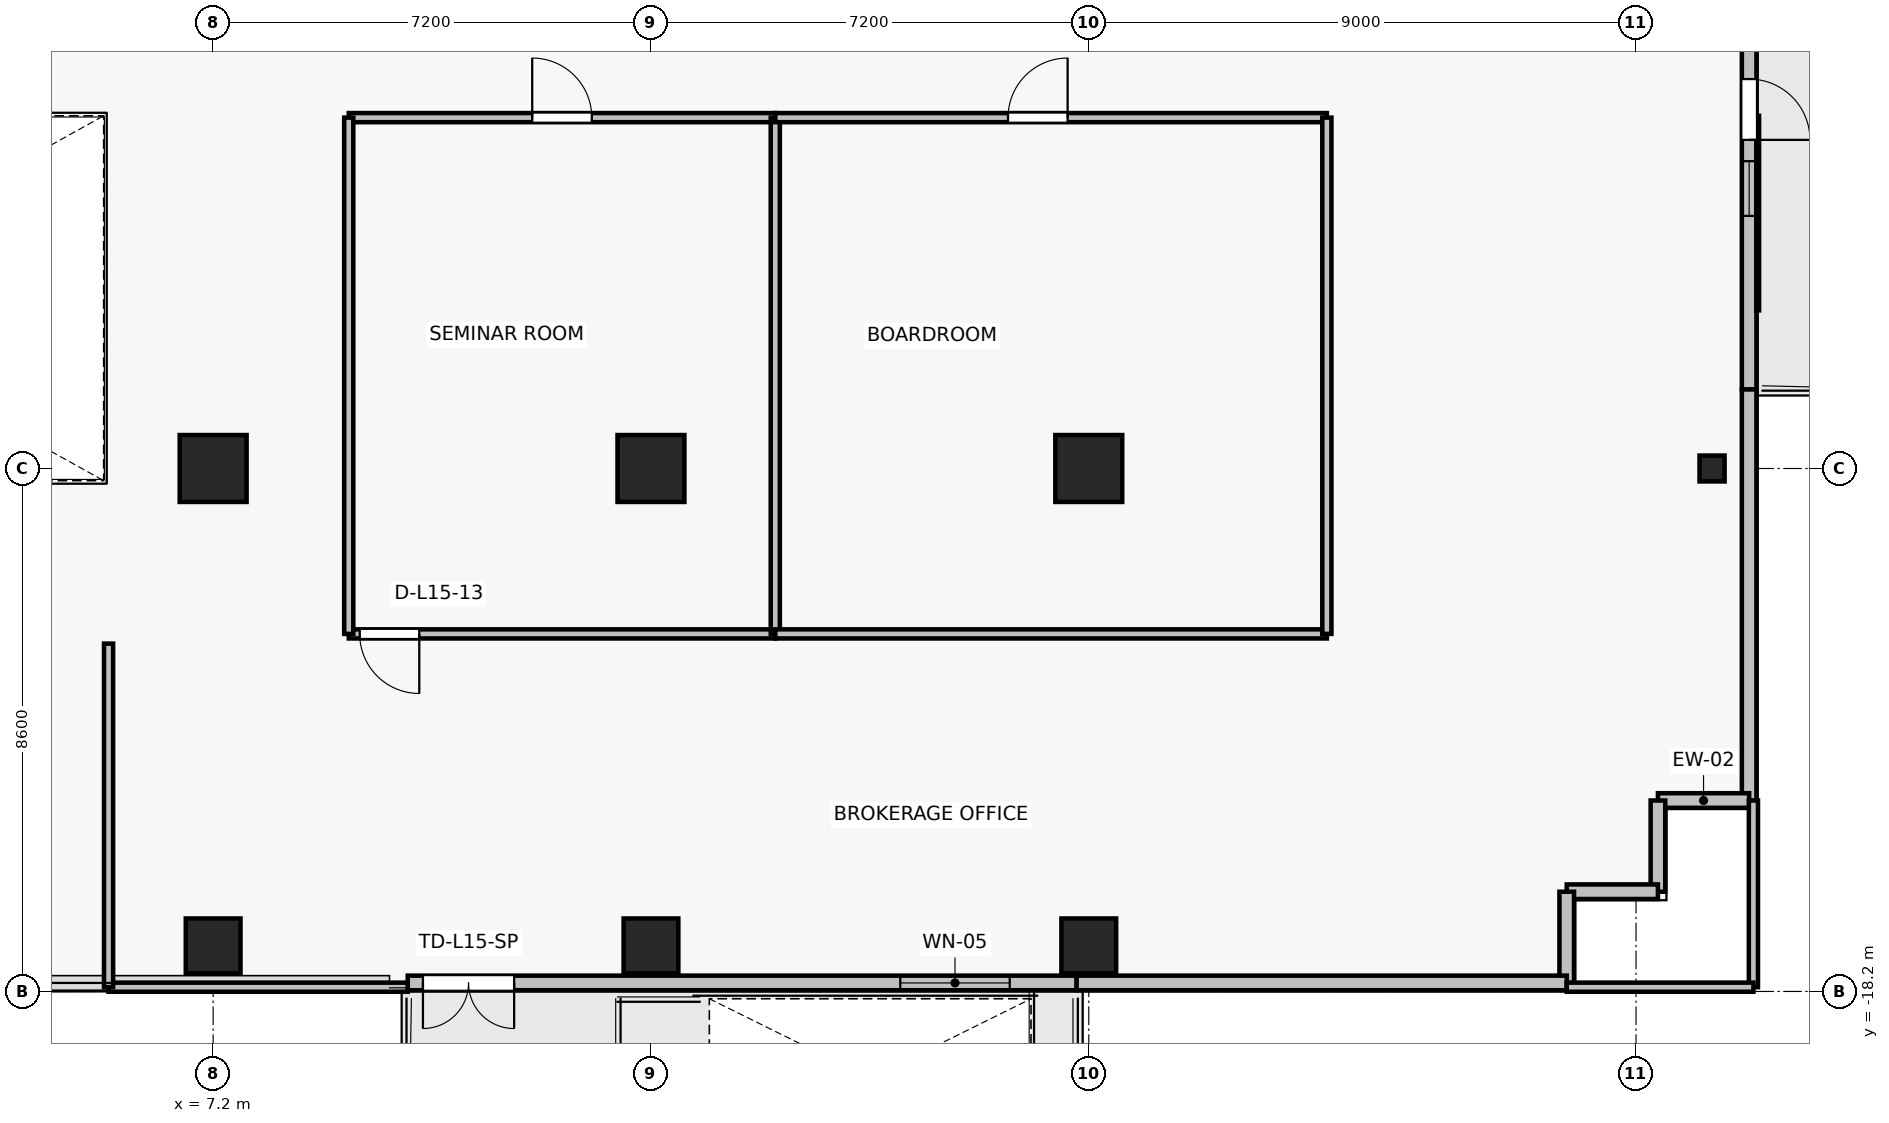
"""IFC4 building model, lengths in metres.
Left out: names, types, materials, properties, quantities, classifications, styles, units other than length and angle.
Written with IfcOpenShell. Run it as: python <this file> out.ifc"""

import sys

from ifc_helpers import new_model, si_unit, direction, frame, frame_2d, origin, origin_2d, place, context, subcontext, project, spatial, rectangle, i_section, extrude, source, transform, mapped, element, fill, save


model = new_model("IFC4")
c1 = context("Model", 3, precision=1e-05, world=origin(), true_north=direction((0.0, 1.0)))
c2 = subcontext(c1, "Body", "Model", "MODEL_VIEW")
j1 = project(units=[si_unit("LENGTHUNIT", "METRE"), si_unit("PLANEANGLEUNIT", "RADIAN")], contexts=[c1])
p1 = place(None, origin())
s1 = spatial("IfcSite", under=j1, at=p1, CompositionType="ELEMENT")
p2 = place(p1, origin())
s2 = spatial("IfcBuilding", under=s1, at=p2, CompositionType="ELEMENT")
p3 = place(p2, frame((0.0, 0.0, 57.1)))
s3 = spatial("IfcBuildingStorey", under=s2, at=p3, CompositionType="ELEMENT", Elevation=57.1)
for number, where, z_axis, x_axis in (
    (1, (7.2, -9.6, 0.0), (0.0, 0.0, 1.0), (1.0, 0.0, 0.0)),
    (2, (14.4, -9.6, 0.0), (0.0, 0.0, 1.0), (1.0, 0.0, 0.0)),
    (3, (21.6, -9.6, 0.0), (0.0, 0.0, 1.0), (1.0, 0.0, 0.0)),
):
    element("IfcColumn", number, at=place(p3, frame(where, z_axis=z_axis, x_axis=x_axis)), inside=s3, PredefinedType="COLUMN", context=c2, shape_type="SweptSolid", body=[
        extrude(rectangle(XDim=1.1, YDim=1.1, at=origin_2d()), origin(), (0.0, 0.0, 1.0), 3.3),
    ])
for number, where, z_axis, x_axis in (
    (4, (7.2, -17.45, 0.0), (0.0, 0.0, 1.0), (1.0, 0.0, 0.0)),
    (5, (14.4, -17.45, 0.0), (0.0, 0.0, 1.0), (1.0, 0.0, 0.0)),
    (6, (21.6, -17.45, 0.0), (0.0, 0.0, 1.0), (1.0, 0.0, 0.0)),
):
    element("IfcColumn", number, at=place(p3, frame(where, z_axis=z_axis, x_axis=x_axis)), inside=s3, PredefinedType="COLUMN", context=c2, shape_type="SweptSolid", body=[
        extrude(rectangle(XDim=0.9, YDim=0.9, at=origin_2d()), origin(), (0.0, 0.0, 1.0), 3.3),
    ])
p4 = place(p3, frame((31.85, -9.6, 0.0), z_axis=(0.0, 0.0, 1.0), x_axis=(1.0, 0.0, 0.0)))
e7 = element("IfcColumn", 7, at=p4, inside=s3, PredefinedType="COLUMN", context=c2, shape_type="SweptSolid", body=[
    extrude(i_section(OverallWidth=0.412, OverallDepth=0.425, WebThickness=0.026, FlangeThickness=0.039, FilletRadius=0.015, at=origin_2d()), origin(), (0.0, 0.0, 1.0), 3.3),
])
p5 = place(p3, frame((32.46, -2.5, 0.0), z_axis=(0.0, 0.0, 1.0), x_axis=(0.0, -1.0, 0.0)))
e8 = element("IfcWall", 8, at=p5, inside=s3, PredefinedType="SOLIDWALL", context=c2, shape_type="SweptSolid", body=[
    extrude(rectangle(XDim=5.8, YDim=0.24, at=frame_2d((2.9, 0.0))), origin(), (0.0, 0.0, 1.0), 3.075),
])
p6 = place(p5, frame((0.696, 0.0, 0.0)))
e9 = element("IfcOpeningElement", 9, at=p6, cuts=e8, PredefinedType="OPENING", context=c2, shape_type="SweptSolid", body=[
    extrude(rectangle(XDim=1.0, YDim=2.2, at=frame_2d((0.5, 1.1))), frame((0.0, 0.13, 0.0), z_axis=(0.0, -1.0, 0.0), x_axis=(1.0, 0.0, 0.0)), (0.0, 0.0, 1.0), 0.26),
])
p7 = place(p5, frame((2.046, 0.0, 0.85)))
e10 = element("IfcOpeningElement", 10, at=p7, cuts=e8, PredefinedType="OPENING", context=c2, shape_type="SweptSolid", body=[
    extrude(rectangle(XDim=0.9, YDim=1.35, at=frame_2d((0.45, 0.675))), frame((0.0, 0.13, 0.0), z_axis=(0.0, -1.0, 0.0), x_axis=(1.0, 0.0, 0.0)), (0.0, 0.0, 1.0), 0.26),
])
p8 = place(p3, frame((21.4, -18.06, 0.0), z_axis=(0.0, 0.0, 1.0), x_axis=(-1.0, 0.0, 0.0)))
e11 = element("IfcWall", 11, at=p8, inside=s3, PredefinedType="SOLIDWALL", context=c2, shape_type="SweptSolid", body=[
    extrude(rectangle(XDim=11.0, YDim=0.24, at=frame_2d((5.5, 0.0))), origin(), (0.0, 0.0, 1.0), 2.665),
])
p9 = place(p8, frame((9.25, 0.0, 0.0)))
e12 = element("IfcOpeningElement", 12, at=p9, cuts=e11, PredefinedType="OPENING", context=c2, shape_type="SweptSolid", body=[
    extrude(rectangle(XDim=1.5, YDim=2.2, at=frame_2d((0.75, 1.1))), frame((0.0, 0.13, 0.0), z_axis=(0.0, -1.0, 0.0), x_axis=(1.0, 0.0, 0.0)), (0.0, 0.0, 1.0), 0.26),
])
p10 = place(p8, frame((1.1, 0.0, 0.85)))
e13 = element("IfcOpeningElement", 13, at=p10, cuts=e11, PredefinedType="OPENING", context=c2, shape_type="SweptSolid", body=[
    extrude(rectangle(XDim=1.8, YDim=1.6, at=frame_2d((0.9, 0.8))), frame((0.0, 0.13, 0.0), z_axis=(0.0, -1.0, 0.0), x_axis=(1.0, 0.0, 0.0)), (0.0, 0.0, 1.0), 0.26),
])
p11 = place(p3, frame((32.46, -15.06, 0.0), z_axis=(0.0, 0.0, 1.0), x_axis=(0.0, 1.0, 0.0)))
e14 = element("IfcWall", 14, at=p11, inside=s3, PredefinedType="SOLIDWALL", context=c2, shape_type="SweptSolid", body=[
    extrude(rectangle(XDim=6.76, YDim=0.24, at=frame_2d((3.38, 0.0))), origin(), (0.0, 0.0, 1.0), 3.075),
])
for number, where, z_axis, x_axis in (
    (15, (30.96, -15.06, 0.0), (0.0, 0.0, 1.0), (1.0, 0.0, 0.0)),
    (16, (30.96, -16.56, 0.0), (0.0, 0.0, 1.0), (0.0, 1.0, 0.0)),
    (17, (29.46, -16.56, 0.0), (0.0, 0.0, 1.0), (1.0, 0.0, 0.0)),
    (18, (29.46, -18.06, 0.0), (0.0, 0.0, 1.0), (0.0, 1.0, 0.0)),
):
    element("IfcWall", number, at=place(p3, frame(where, z_axis=z_axis, x_axis=x_axis)), inside=s3, PredefinedType="SOLIDWALL", context=c2, shape_type="SweptSolid", body=[
        extrude(rectangle(XDim=1.5, YDim=0.24, at=frame_2d((0.75, 0.0))), origin(), (0.0, 0.0, 1.0), 3.075),
    ])
p12 = place(p3, frame((21.4, -18.06, 0.0), z_axis=(0.0, 0.0, 1.0), x_axis=(1.0, 0.0, 0.0)))
e19 = element("IfcWall", 19, at=p12, inside=s3, PredefinedType="SOLIDWALL", context=c2, shape_type="SweptSolid", body=[
    extrude(rectangle(XDim=8.06, YDim=0.24, at=frame_2d((4.03, 0.0))), origin(), (0.0, 0.0, 1.0), 3.075),
])
p13 = place(p3, frame((16.445, -12.32, 0.0), z_axis=(0.0, 0.0, 1.0), x_axis=(-1.0, 0.0, 0.0)))
e20 = element("IfcWall", 20, at=p13, inside=s3, PredefinedType="PARTITIONING", context=c2, shape_type="SweptSolid", body=[
    extrude(rectangle(XDim=7.015, YDim=0.15, at=frame_2d((3.507, 0.0))), origin(), (0.0, 0.0, 1.0), 2.465),
])
p14 = place(p13, frame((5.854, 0.0, 0.0)))
e21 = element("IfcOpeningElement", 21, at=p14, cuts=e20, PredefinedType="OPENING", context=c2, shape_type="SweptSolid", body=[
    extrude(rectangle(XDim=0.98, YDim=2.15, at=frame_2d((0.49, 1.075))), frame((0.0, 0.085, 0.0), z_axis=(0.0, -1.0, 0.0), x_axis=(1.0, 0.0, 0.0)), (0.0, 0.0, 1.0), 0.17),
])
p15 = place(p3, frame((9.43, -3.83, 0.0), z_axis=(0.0, 0.0, 1.0), x_axis=(1.0, 0.0, 0.0)))
e22 = element("IfcWall", 22, at=p15, inside=s3, PredefinedType="PARTITIONING", context=c2, shape_type="SweptSolid", body=[
    extrude(rectangle(XDim=7.015, YDim=0.15, at=frame_2d((3.507, 0.0))), origin(), (0.0, 0.0, 1.0), 2.465),
])
p16 = place(p15, frame((3.017, 0.0, 0.0)))
e23 = element("IfcOpeningElement", 23, at=p16, cuts=e22, PredefinedType="OPENING", context=c2, shape_type="SweptSolid", body=[
    extrude(rectangle(XDim=0.98, YDim=2.15, at=frame_2d((0.49, 1.075))), frame((0.0, 0.085, 0.0), z_axis=(0.0, -1.0, 0.0), x_axis=(1.0, 0.0, 0.0)), (0.0, 0.0, 1.0), 0.17),
])
for number, where, z_axis, x_axis in (
    (24, (9.43, -12.32, 0.0), (0.0, 0.0, 1.0), (0.0, 1.0, 0.0)),
    (25, (16.445, -3.83, 0.0), (0.0, 0.0, 1.0), (0.0, -1.0, 0.0)),
):
    element("IfcWall", number, at=place(p3, frame(where, z_axis=z_axis, x_axis=x_axis)), inside=s3, PredefinedType="PARTITIONING", context=c2, shape_type="SweptSolid", body=[
        extrude(rectangle(XDim=8.49, YDim=0.15, at=frame_2d((4.245, 0.0))), origin(), (0.0, 0.0, 1.0), 2.465),
    ])
p17 = place(p3, frame((25.515, -12.32, 0.0), z_axis=(0.0, 0.0, 1.0), x_axis=(-1.0, 0.0, 0.0)))
e26 = element("IfcWall", 26, at=p17, inside=s3, PredefinedType="PARTITIONING", context=c2, shape_type="SweptSolid", body=[
    extrude(rectangle(XDim=9.071, YDim=0.15, at=frame_2d((4.535, 0.0))), origin(), (0.0, 0.0, 1.0), 2.465),
])
p18 = place(p3, frame((16.445, -3.83, 0.0), z_axis=(0.0, 0.0, 1.0), x_axis=(1.0, 0.0, 0.0)))
e27 = element("IfcWall", 27, at=p18, inside=s3, PredefinedType="PARTITIONING", context=c2, shape_type="SweptSolid", body=[
    extrude(rectangle(XDim=9.071, YDim=0.15, at=frame_2d((4.535, 0.0))), origin(), (0.0, 0.0, 1.0), 2.465),
])
p19 = place(p18, frame((3.827, 0.0, 0.0)))
e28 = element("IfcOpeningElement", 28, at=p19, cuts=e27, PredefinedType="OPENING", context=c2, shape_type="SweptSolid", body=[
    extrude(rectangle(XDim=0.98, YDim=2.15, at=frame_2d((0.49, 1.075))), frame((0.0, 0.085, 0.0), z_axis=(0.0, -1.0, 0.0), x_axis=(1.0, 0.0, 0.0)), (0.0, 0.0, 1.0), 0.17),
])
p20 = place(p3, frame((25.515, -3.83, 0.0), z_axis=(0.0, 0.0, 1.0), x_axis=(0.0, -1.0, 0.0)))
e29 = element("IfcWall", 29, at=p20, inside=s3, PredefinedType="PARTITIONING", context=c2, shape_type="SweptSolid", body=[
    extrude(rectangle(XDim=8.49, YDim=0.15, at=frame_2d((4.245, 0.0))), origin(), (0.0, 0.0, 1.0), 2.465),
])
p21 = place(p3, frame((10.4, -18.13, 0.0), z_axis=(0.0, 0.0, 1.0), x_axis=(-1.0, 0.0, 0.0)))
e30 = element("IfcWall", 30, at=p21, inside=s3, PredefinedType="PARTITIONING", context=c2, shape_type="SweptSolid", body=[
    extrude(rectangle(XDim=4.92, YDim=0.15, at=frame_2d((2.46, 0.0))), origin(), (0.0, 0.0, 1.0), 2.665),
])
p22 = place(p3, frame((5.48, -18.13, 0.0), z_axis=(0.0, 0.0, 1.0), x_axis=(0.0, 1.0, 0.0)))
e31 = element("IfcWall", 31, at=p22, inside=s3, PredefinedType="PARTITIONING", context=c2, shape_type="SweptSolid", body=[
    extrude(rectangle(XDim=5.65, YDim=0.15, at=frame_2d((2.825, 0.0))), origin(), (0.0, 0.0, 1.0), 2.465),
])
p23 = place(p3, frame((32.53, -15.06, 0.0), z_axis=(0.0, 0.0, 1.0), x_axis=(0.0, -1.0, 0.0)))
e32 = element("IfcWall", 32, at=p23, inside=s3, PredefinedType="PARTITIONING", context=c2, shape_type="SweptSolid", body=[
    extrude(rectangle(XDim=3.07, YDim=0.15, at=frame_2d((1.535, 0.0))), origin(), (0.0, 0.0, 1.0), 3.075),
])
p24 = place(p3, frame((32.53, -18.13, 0.0), z_axis=(0.0, 0.0, 1.0), x_axis=(-1.0, 0.0, 0.0)))
e33 = element("IfcWall", 33, at=p24, inside=s3, PredefinedType="PARTITIONING", context=c2, shape_type="SweptSolid", body=[
    extrude(rectangle(XDim=3.07, YDim=0.15, at=frame_2d((1.535, 0.0))), origin(), (0.0, 0.0, 1.0), 2.665),
])
m1 = source(origin(), c2, "Body", "SweptSolid", [
    extrude(rectangle(XDim=1.0, YDim=2.2, at=frame_2d((0.5, 1.1))), frame((0.0, 0.025, 0.0), z_axis=(0.0, -1.0, 0.0), x_axis=(1.0, 0.0, 0.0)), (0.0, 0.0, 1.0), 0.05),
])
p25 = place(p6, origin())
e34 = element("IfcDoor", 34, at=p25, inside=s3, OperationType="SINGLE_SWING_RIGHT", PredefinedType="DOOR", context=c2, shape_type="MappedRepresentation", body=[
    mapped(m1, transform((0.0, 0.0, 0.0), x_axis=(1.0, 0.0, 0.0), y_axis=(0.0, 1.0, 0.0), z_axis=(0.0, 0.0, 1.0), scale=1.0)),
])
fill(e9, e34)
m2 = source(origin(), c2, "Body", "SweptSolid", [
    extrude(rectangle(XDim=0.9, YDim=1.35, at=frame_2d((0.45, 0.675))), frame((0.0, 0.03, 0.0), z_axis=(0.0, -1.0, 0.0), x_axis=(1.0, 0.0, 0.0)), (0.0, 0.0, 1.0), 0.06),
])
p26 = place(p7, origin())
e35 = element("IfcWindow", 35, at=p26, inside=s3, PartitioningType="SINGLE_PANEL", PredefinedType="WINDOW", context=c2, shape_type="MappedRepresentation", body=[
    mapped(m2, transform((0.0, 0.0, 0.0), x_axis=(1.0, 0.0, 0.0), y_axis=(0.0, 1.0, 0.0), z_axis=(0.0, 0.0, 1.0), scale=1.0)),
])
fill(e10, e35)
m3 = source(origin(), c2, "Body", "SweptSolid", [
    extrude(rectangle(XDim=1.5, YDim=2.2, at=frame_2d((0.75, 1.1))), frame((0.0, 0.025, 0.0), z_axis=(0.0, -1.0, 0.0), x_axis=(1.0, 0.0, 0.0)), (0.0, 0.0, 1.0), 0.05),
])
p27 = place(p9, origin())
e36 = element("IfcDoor", 36, at=p27, inside=s3, OperationType="DOUBLE_DOOR_SINGLE_SWING", PredefinedType="DOOR", context=c2, shape_type="MappedRepresentation", body=[
    mapped(m3, transform((0.0, 0.0, 0.0), x_axis=(1.0, 0.0, 0.0), y_axis=(0.0, 1.0, 0.0), z_axis=(0.0, 0.0, 1.0), scale=1.0)),
])
fill(e12, e36)
m4 = source(origin(), c2, "Body", "SweptSolid", [
    extrude(rectangle(XDim=1.8, YDim=1.6, at=frame_2d((0.9, 0.8))), frame((0.0, 0.03, 0.0), z_axis=(0.0, -1.0, 0.0), x_axis=(1.0, 0.0, 0.0)), (0.0, 0.0, 1.0), 0.06),
])
p28 = place(p10, origin())
e37 = element("IfcWindow", 37, at=p28, inside=s3, PartitioningType="SINGLE_PANEL", PredefinedType="WINDOW", context=c2, shape_type="MappedRepresentation", body=[
    mapped(m4, transform((0.0, 0.0, 0.0), x_axis=(1.0, 0.0, 0.0), y_axis=(0.0, 1.0, 0.0), z_axis=(0.0, 0.0, 1.0), scale=1.0)),
])
fill(e13, e37)
m5 = source(origin(), c2, "Body", "SweptSolid", [
    extrude(rectangle(XDim=0.98, YDim=2.15, at=frame_2d((0.49, 1.075))), frame((0.0, 0.025, 0.0), z_axis=(0.0, -1.0, 0.0), x_axis=(1.0, 0.0, 0.0)), (0.0, 0.0, 1.0), 0.05),
])
p29 = place(p16, origin())
e38 = element("IfcDoor", 38, at=p29, inside=s3, OperationType="SINGLE_SWING_LEFT", PredefinedType="DOOR", context=c2, shape_type="MappedRepresentation", body=[
    mapped(m5, transform((0.0, 0.0, 0.0), x_axis=(1.0, 0.0, 0.0), y_axis=(0.0, 1.0, 0.0), z_axis=(0.0, 0.0, 1.0), scale=1.0)),
])
fill(e23, e38)
p30 = place(p19, origin())
e39 = element("IfcDoor", 39, at=p30, inside=s3, OperationType="SINGLE_SWING_RIGHT", PredefinedType="DOOR", context=c2, shape_type="MappedRepresentation", body=[
    mapped(m5, transform((0.0, 0.0, 0.0), x_axis=(1.0, 0.0, 0.0), y_axis=(0.0, 1.0, 0.0), z_axis=(0.0, 0.0, 1.0), scale=1.0)),
])
fill(e28, e39)
p31 = place(p14, origin())
e40 = element("IfcDoor", 40, at=p31, inside=s3, OperationType="SINGLE_SWING_LEFT", PredefinedType="DOOR", context=c2, shape_type="MappedRepresentation", body=[
    mapped(m5, transform((0.0, 0.0, 0.0), x_axis=(1.0, 0.0, 0.0), y_axis=(0.0, 1.0, 0.0), z_axis=(0.0, 0.0, 1.0), scale=1.0)),
])
fill(e21, e40)
save(model, sys.argv[1])
